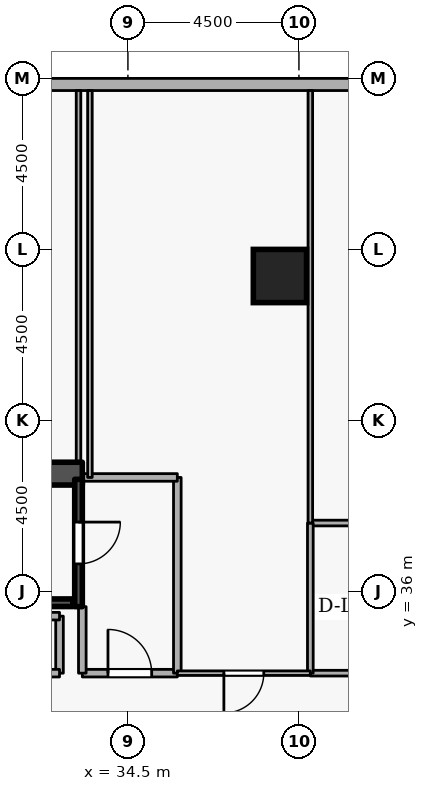
"""IFC4 building model, lengths in metres.
Left out: names, types, materials, properties, quantities, classifications, styles, units other than length and angle.
Written with IfcOpenShell. Run it as: python <this file> out.ifc"""

import sys

from ifc_helpers import new_model, si_unit, direction, frame, frame_2d, origin, origin_2d, place, context, subcontext, project, spatial, rectangle, extrude, element, fill, save


model = new_model("IFC4")
c1 = context("Model", 3, precision=1e-05, world=origin(), true_north=direction((0.0, 1.0)))
c2 = subcontext(c1, "Body", "Model", "MODEL_VIEW")
j1 = project(units=[si_unit("LENGTHUNIT", "METRE"), si_unit("PLANEANGLEUNIT", "RADIAN")], contexts=[c1])
p1 = place(None, origin())
s1 = spatial("IfcSite", under=j1, at=p1, CompositionType="ELEMENT")
p2 = place(p1, origin())
s2 = spatial("IfcBuilding", under=s1, at=p2, CompositionType="ELEMENT")
p3 = place(p2, frame((0.0, 0.0, 18.6)))
s3 = spatial("IfcBuildingStorey", under=s2, at=p3, CompositionType="ELEMENT", Elevation=18.6)
p4 = place(p3, frame((17.7, 39.1, 0.0), z_axis=(0.0, 0.0, 1.0), x_axis=(1.0, 0.0, 0.0)))
e1 = element("IfcWall", 1, at=p4, inside=s3, PredefinedType="SHEAR", context=c2, shape_type="SweptSolid", body=[
    extrude(rectangle(XDim=15.6, YDim=0.6, at=frame_2d((7.8, 0.0))), origin(), (0.0, 0.0, 1.0), 4.5),
])
p5 = place(p3, frame((38.5, 44.3, 0.0), z_axis=(0.0, 0.0, 1.0), x_axis=(1.0, 0.0, 0.0)))
e2 = element("IfcColumn", 2, at=p5, inside=s3, PredefinedType="COLUMN", context=c2, shape_type="SweptSolid", body=[
    extrude(rectangle(XDim=1.4, YDim=1.4, at=origin_2d()), origin(), (0.0, 0.0, 1.0), 4.5),
])
p6 = place(p3, frame((42.4, 49.34, 0.0), z_axis=(0.0, 0.0, 1.0), x_axis=(-1.0, 0.0, 0.0)))
e3 = element("IfcWall", 3, at=p6, inside=s3, PredefinedType="STANDARD", context=c2, shape_type="SweptSolid", body=[
    extrude(rectangle(XDim=39.4, YDim=0.32, at=frame_2d((19.7, 0.0))), origin(), (0.0, 0.0, 1.0), 3.56),
])
p7 = place(p6, frame((12.8, 0.0, 0.78)))
e4 = element("IfcOpeningElement", 4, at=p7, cuts=e3, PredefinedType="OPENING", context=c2, shape_type="SweptSolid", body=[
    extrude(rectangle(XDim=1.8, YDim=2.15, at=frame_2d((0.9, 1.075))), frame((0.0, 0.17, 0.0), z_axis=(0.0, -1.0, 0.0), x_axis=(1.0, 0.0, 0.0)), (0.0, 0.0, 1.0), 0.34),
])
p8 = place(p6, frame((22.8, 0.0, 0.78)))
e5 = element("IfcOpeningElement", 5, at=p8, cuts=e3, PredefinedType="OPENING", context=c2, shape_type="SweptSolid", body=[
    extrude(rectangle(XDim=1.8, YDim=2.15, at=frame_2d((0.9, 1.075))), frame((0.0, 0.17, 0.0), z_axis=(0.0, -1.0, 0.0), x_axis=(1.0, 0.0, 0.0)), (0.0, 0.0, 1.0), 0.34),
])
p9 = place(p3, frame((33.2, 38.95, 0.0), z_axis=(0.0, 0.0, 1.0), x_axis=(0.0, -1.0, 0.0)))
e6 = element("IfcWall", 6, at=p9, inside=s3, PredefinedType="SHEAR", context=c2, shape_type="SweptSolid", body=[
    extrude(rectangle(XDim=3.35, YDim=0.2, at=frame_2d((1.675, 0.0))), origin(), (0.0, 0.0, 1.0), 4.5),
])
p10 = place(p9, frame((1.125, 0.0, 0.0)))
e7 = element("IfcOpeningElement", 7, at=p10, cuts=e6, PredefinedType="OPENING", context=c2, shape_type="SweptSolid", body=[
    extrude(rectangle(XDim=1.1, YDim=2.1, at=frame_2d((0.55, 1.05))), frame((0.0, 0.11, 0.0), z_axis=(0.0, -1.0, 0.0), x_axis=(1.0, 0.0, 0.0)), (0.0, 0.0, 1.0), 0.22),
])
p11 = place(p3, frame((25.95, 35.703, 0.0), z_axis=(0.0, 0.0, 1.0), x_axis=(1.0, 0.0, 0.0)))
e8 = element("IfcWall", 8, at=p11, inside=s3, PredefinedType="SHEAR", context=c2, shape_type="SweptSolid", body=[
    extrude(rectangle(XDim=7.1, YDim=0.2, at=frame_2d((3.55, 0.0))), origin(), (0.0, 0.0, 1.0), 4.5),
])
p12 = place(p3, frame((33.3, 33.85, 0.0), z_axis=(0.0, 0.0, 1.0), x_axis=(1.0, 0.0, 0.0)))
e9 = element("IfcWall", 9, at=p12, inside=s3, PredefinedType="STANDARD", context=c2, shape_type="SweptSolid", body=[
    extrude(rectangle(XDim=2.5, YDim=0.2, at=frame_2d((1.25, 0.0))), origin(), (0.0, 0.0, 1.0), 4.16),
])
p13 = place(p12, frame((0.675, 0.0, 0.0)))
e10 = element("IfcOpeningElement", 10, at=p13, cuts=e9, PredefinedType="OPENING", context=c2, shape_type="SweptSolid", body=[
    extrude(rectangle(XDim=1.15, YDim=2.1, at=frame_2d((0.575, 1.05))), frame((0.0, 0.11, 0.0), z_axis=(0.0, -1.0, 0.0), x_axis=(1.0, 0.0, 0.0)), (0.0, 0.0, 1.0), 0.22),
])
p14 = place(p3, frame((35.8, 33.85, 0.0), z_axis=(0.0, 0.0, 1.0), x_axis=(0.0, 1.0, 0.0)))
e11 = element("IfcWall", 11, at=p14, inside=s3, PredefinedType="STANDARD", context=c2, shape_type="SweptSolid", body=[
    extrude(rectangle(XDim=5.15, YDim=0.2, at=frame_2d((2.575, 0.0))), origin(), (0.0, 0.0, 1.0), 4.16),
])
p15 = place(p3, frame((35.8, 39.0, 0.0), z_axis=(0.0, 0.0, 1.0), x_axis=(-1.0, 0.0, 0.0)))
e12 = element("IfcWall", 12, at=p15, inside=s3, PredefinedType="STANDARD", context=c2, shape_type="SweptSolid", body=[
    extrude(rectangle(XDim=2.5, YDim=0.2, at=frame_2d((1.25, 0.0))), origin(), (0.0, 0.0, 1.0), 4.16),
])
p16 = place(p3, frame((33.3, 35.6, 0.0), z_axis=(0.0, 0.0, 1.0), x_axis=(0.0, -1.0, 0.0)))
e13 = element("IfcWall", 13, at=p16, inside=s3, PredefinedType="STANDARD", context=c2, shape_type="SweptSolid", body=[
    extrude(rectangle(XDim=1.75, YDim=0.2, at=frame_2d((0.875, 0.0))), origin(), (0.0, 0.0, 1.0), 3.365),
])
p17 = place(p3, frame((32.7, 35.35, 0.0), z_axis=(0.0, 0.0, 1.0), x_axis=(0.0, -1.0, 0.0)))
e14 = element("IfcWall", 14, at=p17, inside=s3, PredefinedType="STANDARD", context=c2, shape_type="SweptSolid", body=[
    extrude(rectangle(XDim=1.5, YDim=0.2, at=frame_2d((0.75, 0.0))), origin(), (0.0, 0.0, 1.0), 3.365),
])
p18 = place(p3, frame((32.7, 33.85, 0.0), z_axis=(0.0, 0.0, 1.0), x_axis=(-1.0, 0.0, 0.0)))
e15 = element("IfcWall", 15, at=p18, inside=s3, PredefinedType="STANDARD", context=c2, shape_type="SweptSolid", body=[
    extrude(rectangle(XDim=2.35, YDim=0.2, at=frame_2d((1.175, 0.0))), origin(), (0.0, 0.0, 1.0), 4.16),
])
p19 = place(p18, frame((0.6, 0.0, 0.0)))
e16 = element("IfcOpeningElement", 16, at=p19, cuts=e15, PredefinedType="OPENING", context=c2, shape_type="SweptSolid", body=[
    extrude(rectangle(XDim=1.15, YDim=2.1, at=frame_2d((0.575, 1.05))), frame((0.0, 0.11, 0.0), z_axis=(0.0, -1.0, 0.0), x_axis=(1.0, 0.0, 0.0)), (0.0, 0.0, 1.0), 0.22),
])
p20 = place(p3, frame((30.35, 35.35, 0.0), z_axis=(0.0, 0.0, 1.0), x_axis=(1.0, 0.0, 0.0)))
e17 = element("IfcWall", 17, at=p20, inside=s3, PredefinedType="STANDARD", context=c2, shape_type="SweptSolid", body=[
    extrude(rectangle(XDim=2.35, YDim=0.2, at=frame_2d((1.175, 0.0))), origin(), (0.0, 0.0, 1.0), 4.16),
])
p21 = place(p3, frame((39.3, 33.85, 0.0), z_axis=(0.0, 0.0, 1.0), x_axis=(1.0, 0.0, 0.0)))
e18 = element("IfcWall", 18, at=p21, inside=s3, PredefinedType="PARTITIONING", context=c2, shape_type="SweptSolid", body=[
    extrude(rectangle(XDim=3.45, YDim=0.15, at=frame_2d((1.725, 0.0))), origin(), (0.0, 0.0, 1.0), 4.16),
])
p22 = place(p21, frame((1.265, 0.0, 0.0)))
e19 = element("IfcOpeningElement", 19, at=p22, cuts=e18, PredefinedType="OPENING", context=c2, shape_type="SweptSolid", body=[
    extrude(rectangle(XDim=0.92, YDim=2.08, at=frame_2d((0.46, 1.04))), frame((0.0, 0.085, 0.0), z_axis=(0.0, -1.0, 0.0), x_axis=(1.0, 0.0, 0.0)), (0.0, 0.0, 1.0), 0.17),
])
p23 = place(p3, frame((42.75, 37.8, 0.0), z_axis=(0.0, 0.0, 1.0), x_axis=(-1.0, 0.0, 0.0)))
e20 = element("IfcWall", 20, at=p23, inside=s3, PredefinedType="PARTITIONING", context=c2, shape_type="SweptSolid", body=[
    extrude(rectangle(XDim=3.45, YDim=0.15, at=frame_2d((1.725, 0.0))), origin(), (0.0, 0.0, 1.0), 4.16),
])
p24 = place(p3, frame((39.3, 37.8, 0.0), z_axis=(0.0, 0.0, 1.0), x_axis=(0.0, -1.0, 0.0)))
e21 = element("IfcWall", 21, at=p24, inside=s3, PredefinedType="PARTITIONING", context=c2, shape_type="SweptSolid", body=[
    extrude(rectangle(XDim=3.95, YDim=0.15, at=frame_2d((1.975, 0.0))), origin(), (0.0, 0.0, 1.0), 4.16),
])
p25 = place(p3, frame((39.3, 49.18, 0.0), z_axis=(0.0, 0.0, 1.0), x_axis=(0.0, -1.0, 0.0)))
e22 = element("IfcWall", 22, at=p25, inside=s3, PredefinedType="PARTITIONING", context=c2, shape_type="SweptSolid", body=[
    extrude(rectangle(XDim=11.38, YDim=0.12, at=frame_2d((5.69, 0.0))), origin(), (0.0, 0.0, 1.0), 4.16),
])
p26 = place(p3, frame((39.3, 33.85, 0.0), z_axis=(0.0, 0.0, 1.0), x_axis=(-1.0, 0.0, 0.0)))
e23 = element("IfcWall", 23, at=p26, inside=s3, PredefinedType="PARTITIONING", context=c2, shape_type="SweptSolid", body=[
    extrude(rectangle(XDim=3.5, YDim=0.12, at=frame_2d((1.75, 0.0))), origin(), (0.0, 0.0, 1.0), 4.16),
])
p27 = place(p26, frame((1.225, 0.0, 0.0)))
e24 = element("IfcOpeningElement", 24, at=p27, cuts=e23, PredefinedType="OPENING", context=c2, shape_type="SweptSolid", body=[
    extrude(rectangle(XDim=1.05, YDim=2.1, at=frame_2d((0.525, 1.05))), frame((0.0, 0.07, 0.0), z_axis=(0.0, -1.0, 0.0), x_axis=(1.0, 0.0, 0.0)), (0.0, 0.0, 1.0), 0.14),
])
p28 = place(p3, frame((33.5, 39.0, 0.0), z_axis=(0.0, 0.0, 1.0), x_axis=(0.0, 1.0, 0.0)))
e25 = element("IfcWall", 25, at=p28, inside=s3, PredefinedType="PARTITIONING", context=c2, shape_type="SweptSolid", body=[
    extrude(rectangle(XDim=10.18, YDim=0.12, at=frame_2d((5.09, 0.0))), origin(), (0.0, 0.0, 1.0), 4.16),
])
p29 = place(p3, frame((33.2, 49.18, 0.0), z_axis=(0.0, 0.0, 1.0), x_axis=(0.0, -1.0, 0.0)))
e26 = element("IfcWall", 26, at=p29, inside=s3, PredefinedType="PARTITIONING", context=c2, shape_type="SweptSolid", body=[
    extrude(rectangle(XDim=9.98, YDim=0.12, at=frame_2d((4.99, 0.0))), origin(), (0.0, 0.0, 1.0), 4.16),
])
p30 = place(p10, origin())
e27 = element("IfcDoor", 27, at=p30, inside=s3, OperationType="SINGLE_SWING_LEFT", PredefinedType="DOOR", context=c2, shape_type="SweptSolid", body=[
    extrude(rectangle(XDim=1.1, YDim=2.1, at=frame_2d((0.55, 1.05))), frame((0.0, 0.025, 0.0), z_axis=(0.0, -1.0, 0.0), x_axis=(1.0, 0.0, 0.0)), (0.0, 0.0, 1.0), 0.05),
])
fill(e7, e27)
p31 = place(p13, origin())
e28 = element("IfcDoor", 28, at=p31, inside=s3, OperationType="SINGLE_SWING_LEFT", PredefinedType="DOOR", context=c2, shape_type="SweptSolid", body=[
    extrude(rectangle(XDim=1.15, YDim=2.1, at=frame_2d((0.575, 1.05))), frame((0.0, 0.025, 0.0), z_axis=(0.0, -1.0, 0.0), x_axis=(1.0, 0.0, 0.0)), (0.0, 0.0, 1.0), 0.05),
])
fill(e10, e28)
p32 = place(p27, origin())
e29 = element("IfcDoor", 29, at=p32, inside=s3, OperationType="SINGLE_SWING_RIGHT", PredefinedType="DOOR", context=c2, shape_type="SweptSolid", body=[
    extrude(rectangle(XDim=1.05, YDim=2.1, at=frame_2d((0.525, 1.05))), frame((0.0, 0.025, 0.0), z_axis=(0.0, -1.0, 0.0), x_axis=(1.0, 0.0, 0.0)), (0.0, 0.0, 1.0), 0.05),
])
fill(e24, e29)
save(model, sys.argv[1])
